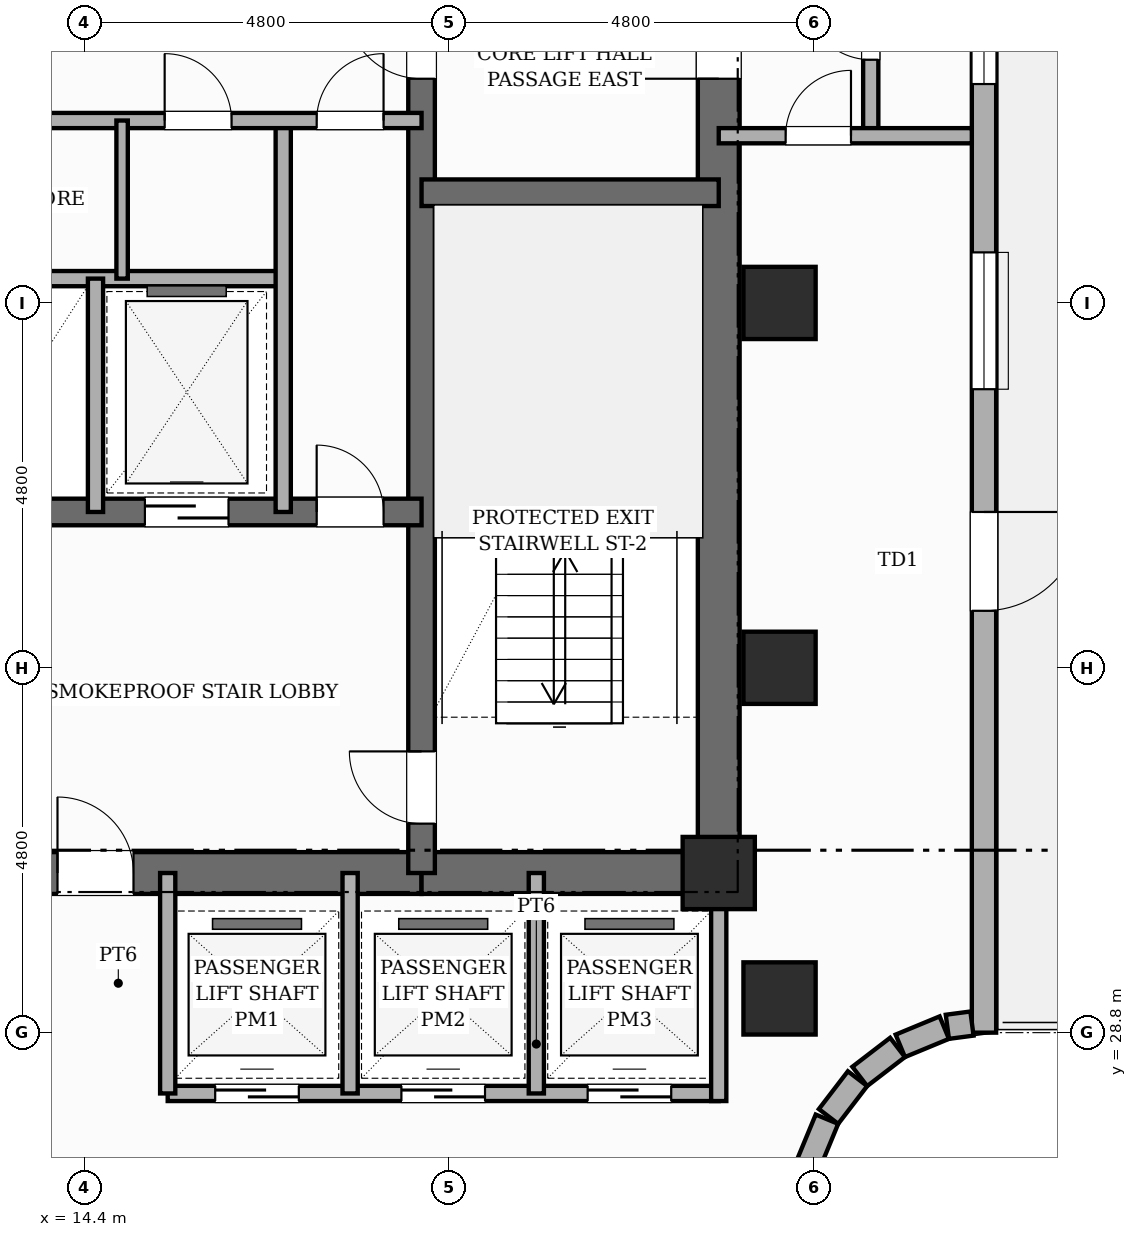
"""IFC4 building model, lengths in metres.
Left out: names, types, materials, properties, quantities, classifications, styles, units other than length and angle.
Written with IfcOpenShell. Run it as: python <this file> out.ifc"""

import sys

from ifc_helpers import new_model, si_unit, direction, frame, frame_2d, origin, origin_2d, place, context, subcontext, project, spatial, rectangle, extrude, element, fill, save


model = new_model("IFC4")
c1 = context("Model", 3, precision=1e-05, world=origin(), true_north=direction((0.0, 1.0)))
c2 = subcontext(c1, "Body", "Model", "MODEL_VIEW")
j1 = project(units=[si_unit("LENGTHUNIT", "METRE"), si_unit("PLANEANGLEUNIT", "RADIAN")], contexts=[c1])
p1 = place(None, origin())
s1 = spatial("IfcSite", under=j1, at=p1, CompositionType="ELEMENT")
p2 = place(p1, origin())
s2 = spatial("IfcBuilding", under=s1, at=p2, CompositionType="ELEMENT")
p3 = place(p2, frame((0.0, 0.0, 154.0)))
s3 = spatial("IfcBuildingStorey", under=s2, at=p3, CompositionType="ELEMENT", Elevation=154.0)
p4 = place(p3, frame((22.75, 30.625, 0.0), z_axis=(0.0, 0.0, 1.0), x_axis=(0.0, 1.0, 0.0)))
e1 = element("IfcWall", 1, at=p4, inside=s3, PredefinedType="SHEAR", context=c2, shape_type="SweptSolid", body=[
    extrude(rectangle(XDim=15.45, YDim=0.55, at=frame_2d((7.725, 0.0))), origin(), (0.0, 0.0, 1.0), 3.6),
])
p5 = place(p4, frame((10.725, 0.0, 0.0)))
e2 = element("IfcOpeningElement", 2, at=p5, cuts=e1, PredefinedType="OPENING", context=c2, shape_type="SweptSolid", body=[
    extrude(rectangle(XDim=1.0, YDim=2.15, at=frame_2d((0.5, 1.075))), frame((0.0, 0.285, 0.0), z_axis=(0.0, -1.0, 0.0), x_axis=(1.0, 0.0, 0.0)), (0.0, 0.0, 1.0), 0.57),
])
p6 = place(p3, frame((9.96, 30.9, 0.0), z_axis=(0.0, 0.0, 1.0), x_axis=(1.0, 0.0, 0.0)))
e3 = element("IfcWall", 3, at=p6, inside=s3, PredefinedType="SHEAR", context=c2, shape_type="SweptSolid", body=[
    extrude(rectangle(XDim=8.88, YDim=0.55, at=frame_2d((4.44, 0.0))), origin(), (0.0, 0.0, 1.0), 3.6),
])
p7 = place(p6, frame((4.09, 0.0, 0.0)))
e4 = element("IfcOpeningElement", 4, at=p7, cuts=e3, PredefinedType="OPENING", context=c2, shape_type="SweptSolid", body=[
    extrude(rectangle(XDim=1.0, YDim=2.15, at=frame_2d((0.5, 1.075))), frame((0.0, 0.285, 0.0), z_axis=(0.0, -1.0, 0.0), x_axis=(1.0, 0.0, 0.0)), (0.0, 0.0, 1.0), 0.57),
])
p8 = place(p3, frame((18.84, 30.9, 0.0), z_axis=(0.0, 0.0, 1.0), x_axis=(1.0, 0.0, 0.0)))
e5 = element("IfcWall", 5, at=p8, inside=s3, PredefinedType="SHEAR", context=c2, shape_type="SweptSolid", body=[
    extrude(rectangle(XDim=3.91, YDim=0.55, at=frame_2d((1.955, 0.0))), origin(), (0.0, 0.0, 1.0), 3.6),
])
p9 = place(p3, frame((18.84, 30.9, 0.0), z_axis=(0.0, 0.0, 1.0), x_axis=(0.0, 1.0, 0.0)))
e6 = element("IfcWall", 6, at=p9, inside=s3, PredefinedType="SHEAR", context=c2, shape_type="SweptSolid", body=[
    extrude(rectangle(XDim=14.9, YDim=0.35, at=frame_2d((7.45, 0.0))), origin(), (0.0, 0.0, 1.0), 3.6),
])
p10 = place(p9, frame((0.65, 0.0, 0.0)))
e7 = element("IfcOpeningElement", 7, at=p10, cuts=e6, PredefinedType="OPENING", context=c2, shape_type="SweptSolid", body=[
    extrude(rectangle(XDim=0.95, YDim=2.1, at=frame_2d((0.475, 1.05))), frame((0.0, 0.185, 0.0), z_axis=(0.0, -1.0, 0.0), x_axis=(1.0, 0.0, 0.0)), (0.0, 0.0, 1.0), 0.37),
])
p11 = place(p9, frame((10.45, 0.0, 0.0)))
e8 = element("IfcOpeningElement", 8, at=p11, cuts=e6, PredefinedType="OPENING", context=c2, shape_type="SweptSolid", body=[
    extrude(rectangle(XDim=1.0, YDim=2.15, at=frame_2d((0.5, 1.075))), frame((0.0, 0.185, 0.0), z_axis=(0.0, -1.0, 0.0), x_axis=(1.0, 0.0, 0.0)), (0.0, 0.0, 1.0), 0.37),
])
p12 = place(p3, frame((18.84, 39.85, 0.0), z_axis=(0.0, 0.0, 1.0), x_axis=(1.0, 0.0, 0.0)))
e9 = element("IfcWall", 9, at=p12, inside=s3, PredefinedType="SHEAR", context=c2, shape_type="SweptSolid", body=[
    extrude(rectangle(XDim=3.91, YDim=0.35, at=frame_2d((1.955, 0.0))), origin(), (0.0, 0.0, 1.0), 3.6),
])
p13 = place(p3, frame((9.96, 35.65, 0.0), z_axis=(0.0, 0.0, 1.0), x_axis=(1.0, 0.0, 0.0)))
e10 = element("IfcWall", 10, at=p13, inside=s3, PredefinedType="SHEAR", context=c2, shape_type="SweptSolid", body=[
    extrude(rectangle(XDim=8.88, YDim=0.35, at=frame_2d((4.44, 0.0))), origin(), (0.0, 0.0, 1.0), 3.6),
])
p14 = place(p13, frame((0.84, 0.0, 0.0)))
e11 = element("IfcOpeningElement", 11, at=p14, cuts=e10, PredefinedType="OPENING", context=c2, shape_type="SweptSolid", body=[
    extrude(rectangle(XDim=1.1, YDim=2.15, at=frame_2d((0.55, 1.075))), frame((0.0, 0.185, 0.0), z_axis=(0.0, -1.0, 0.0), x_axis=(1.0, 0.0, 0.0)), (0.0, 0.0, 1.0), 0.37),
])
p15 = place(p13, frame((5.24, 0.0, 0.0)))
e12 = element("IfcOpeningElement", 12, at=p15, cuts=e10, PredefinedType="OPENING", context=c2, shape_type="SweptSolid", body=[
    extrude(rectangle(XDim=1.1, YDim=2.15, at=frame_2d((0.55, 1.075))), frame((0.0, 0.185, 0.0), z_axis=(0.0, -1.0, 0.0), x_axis=(1.0, 0.0, 0.0)), (0.0, 0.0, 1.0), 0.37),
])
p16 = place(p13, frame((7.5, 0.0, 0.0)))
e13 = element("IfcOpeningElement", 13, at=p16, cuts=e10, PredefinedType="OPENING", context=c2, shape_type="SweptSolid", body=[
    extrude(rectangle(XDim=0.88, YDim=2.1, at=frame_2d((0.44, 1.05))), frame((0.0, 0.185, 0.0), z_axis=(0.0, -1.0, 0.0), x_axis=(1.0, 0.0, 0.0)), (0.0, 0.0, 1.0), 0.37),
])
for number, where, z_axis, x_axis in (
    (14, (22.75, 30.9, 0.0), (0.0, 0.0, 1.0), (1.0, 0.0, 0.0)),
    (15, (23.55, 29.25, 0.0), (0.0, 0.0, 1.0), (1.0, 0.0, 0.0)),
    (16, (23.55, 33.6, 0.0), (0.0, 0.0, 1.0), (1.0, 0.0, 0.0)),
    (17, (23.55, 38.4, 0.0), (0.0, 0.0, 1.0), (1.0, 0.0, 0.0)),
):
    element("IfcColumn", number, at=place(p3, frame(where, z_axis=z_axis, x_axis=x_axis)), inside=s3, PredefinedType="COLUMN", context=c2, shape_type="SweptSolid", body=[
        extrude(rectangle(XDim=0.95, YDim=0.95, at=origin_2d()), origin(), (0.0, 0.0, 1.0), 3.6),
    ])
p17 = place(p3, frame((26.24, 43.8, 0.0), z_axis=(0.0, 0.0, 1.0), x_axis=(0.0, -1.0, 0.0)))
e18 = element("IfcWall", 18, at=p17, inside=s3, PredefinedType="STANDARD", context=c2, shape_type="SweptSolid", body=[
    extrude(rectangle(XDim=15.0, YDim=0.32, at=frame_2d((7.5, 0.0))), origin(), (0.0, 0.0, 1.0), 3.36),
])
p18 = place(p17, frame((8.15, 0.0, 0.0)))
e19 = element("IfcOpeningElement", 19, at=p18, cuts=e18, PredefinedType="OPENING", context=c2, shape_type="SweptSolid", body=[
    extrude(rectangle(XDim=1.3, YDim=2.2, at=frame_2d((0.65, 1.1))), frame((0.0, 0.17, 0.0), z_axis=(0.0, -1.0, 0.0), x_axis=(1.0, 0.0, 0.0)), (0.0, 0.0, 1.0), 0.34),
])
p19 = place(p17, frame((4.735, 0.0, 0.8)))
e20 = element("IfcOpeningElement", 20, at=p19, cuts=e18, PredefinedType="OPENING", context=c2, shape_type="SweptSolid", body=[
    extrude(rectangle(XDim=1.8, YDim=2.1, at=frame_2d((0.9, 1.05))), frame((0.0, 0.17, 0.0), z_axis=(0.0, -1.0, 0.0), x_axis=(1.0, 0.0, 0.0)), (0.0, 0.0, 1.0), 0.34),
])
p20 = place(p17, frame((0.72, 0.0, 0.8)))
e21 = element("IfcOpeningElement", 21, at=p20, cuts=e18, PredefinedType="OPENING", context=c2, shape_type="SweptSolid", body=[
    extrude(rectangle(XDim=1.8, YDim=2.1, at=frame_2d((0.9, 1.05))), frame((0.0, 0.17, 0.0), z_axis=(0.0, -1.0, 0.0), x_axis=(1.0, 0.0, 0.0)), (0.0, 0.0, 1.0), 0.34),
])
p21 = place(p3, frame((26.082, 28.919, 0.0), z_axis=(0.0, 0.0, 1.0), x_axis=(-0.991512688813, -0.130009953168, 0.0)))
e22 = element("IfcWall", 22, at=p21, inside=s3, PredefinedType="STANDARD", context=c2, shape_type="SweptSolid", body=[
    extrude(rectangle(XDim=0.327, YDim=0.32, at=frame_2d((0.163, 0.0))), origin(), (0.0, 0.0, 1.0), 3.36),
])
p22 = place(p3, frame((25.718, 28.866, 0.0), z_axis=(0.0, 0.0, 1.0), x_axis=(-0.923836271867, -0.382787856107, 0.0)))
e23 = element("IfcWall", 23, at=p22, inside=s3, PredefinedType="STANDARD", context=c2, shape_type="SweptSolid", body=[
    extrude(rectangle(XDim=0.626, YDim=0.32, at=frame_2d((0.313, 0.0))), origin(), (0.0, 0.0, 1.0), 3.36),
])
for number, where, z_axis, x_axis in (
    (24, (25.103, 28.605, 0.0), (0.0, 0.0, 1.0), (-0.793, -0.609, 0.0)),
    (25, (24.576, 28.195, 0.0), (0.0, 0.0, 1.0), (-0.609, -0.793, 0.0)),
):
    element("IfcWall", number, at=place(p3, frame(where, z_axis=z_axis, x_axis=x_axis)), inside=s3, PredefinedType="STANDARD", context=c2, shape_type="SweptSolid", body=[
        extrude(rectangle(XDim=0.626, YDim=0.32, at=frame_2d((0.313, 0.0))), origin(), (0.0, 0.0, 1.0), 3.36),
    ])
p23 = place(p3, frame((24.174, 27.661, 0.0), z_axis=(0.0, 0.0, 1.0), x_axis=(-0.382455093999, -0.923974080304, 0.0)))
e26 = element("IfcWall", 26, at=p23, inside=s3, PredefinedType="STANDARD", context=c2, shape_type="SweptSolid", body=[
    extrude(rectangle(XDim=0.626, YDim=0.32, at=frame_2d((0.313, 0.0))), origin(), (0.0, 0.0, 1.0), 3.36),
])
p24 = place(p3, frame((9.96, 38.72, 0.0), z_axis=(0.0, 0.0, 1.0), x_axis=(1.0, 0.0, 0.0)))
e27 = element("IfcWall", 27, at=p24, inside=s3, PredefinedType="POLYGONAL", context=c2, shape_type="SweptSolid", body=[
    extrude(rectangle(XDim=7.06, YDim=0.2, at=frame_2d((3.53, 0.0))), origin(), (0.0, 0.0, 1.0), 3.36),
])
p25 = place(p3, frame((14.55, 35.65, 0.0), z_axis=(0.0, 0.0, 1.0), x_axis=(0.0, 1.0, 0.0)))
e28 = element("IfcWall", 28, at=p25, inside=s3, PredefinedType="POLYGONAL", context=c2, shape_type="SweptSolid", body=[
    extrude(rectangle(XDim=3.07, YDim=0.2, at=frame_2d((1.535, 0.0))), origin(), (0.0, 0.0, 1.0), 3.36),
])
p26 = place(p3, frame((17.02, 35.65, 0.0), z_axis=(0.0, 0.0, 1.0), x_axis=(0.0, 1.0, 0.0)))
e29 = element("IfcWall", 29, at=p26, inside=s3, PredefinedType="POLYGONAL", context=c2, shape_type="SweptSolid", body=[
    extrude(rectangle(XDim=5.15, YDim=0.2, at=frame_2d((2.575, 0.0))), origin(), (0.0, 0.0, 1.0), 3.36),
])
p27 = place(p3, frame((9.96, 40.8, 0.0), z_axis=(0.0, 0.0, 1.0), x_axis=(1.0, 0.0, 0.0)))
e30 = element("IfcWall", 30, at=p27, inside=s3, PredefinedType="POLYGONAL", context=c2, shape_type="SweptSolid", body=[
    extrude(rectangle(XDim=8.88, YDim=0.2, at=frame_2d((4.44, 0.0))), origin(), (0.0, 0.0, 1.0), 3.36),
])
p28 = place(p27, frame((7.5, 0.0, 0.0)))
e31 = element("IfcOpeningElement", 31, at=p28, cuts=e30, PredefinedType="OPENING", context=c2, shape_type="SweptSolid", body=[
    extrude(rectangle(XDim=0.88, YDim=2.1, at=frame_2d((0.44, 1.05))), frame((0.0, 0.11, 0.0), z_axis=(0.0, -1.0, 0.0), x_axis=(1.0, 0.0, 0.0)), (0.0, 0.0, 1.0), 0.22),
])
p29 = place(p27, frame((2.2, 0.0, 0.0)))
e32 = element("IfcOpeningElement", 32, at=p29, cuts=e30, PredefinedType="OPENING", context=c2, shape_type="SweptSolid", body=[
    extrude(rectangle(XDim=0.88, YDim=2.1, at=frame_2d((0.44, 1.05))), frame((0.0, 0.11, 0.0), z_axis=(0.0, -1.0, 0.0), x_axis=(1.0, 0.0, 0.0)), (0.0, 0.0, 1.0), 0.22),
])
p30 = place(p27, frame((5.5, 0.0, 0.0)))
e33 = element("IfcOpeningElement", 33, at=p30, cuts=e30, PredefinedType="OPENING", context=c2, shape_type="SweptSolid", body=[
    extrude(rectangle(XDim=0.88, YDim=2.1, at=frame_2d((0.44, 1.05))), frame((0.0, 0.11, 0.0), z_axis=(0.0, -1.0, 0.0), x_axis=(1.0, 0.0, 0.0)), (0.0, 0.0, 1.0), 0.22),
])
p31 = place(p3, frame((14.9, 38.72, 0.0), z_axis=(0.0, 0.0, 1.0), x_axis=(0.0, 1.0, 0.0)))
e34 = element("IfcWall", 34, at=p31, inside=s3, PredefinedType="PARTITIONING", context=c2, shape_type="SweptSolid", body=[
    extrude(rectangle(XDim=2.08, YDim=0.15, at=frame_2d((1.04, 0.0))), origin(), (0.0, 0.0, 1.0), 3.36),
])
p32 = place(p3, frame((15.5, 28.0, 0.0), z_axis=(0.0, 0.0, 1.0), x_axis=(1.0, 0.0, 0.0)))
e35 = element("IfcWall", 35, at=p32, inside=s3, PredefinedType="POLYGONAL", context=c2, shape_type="SweptSolid", body=[
    extrude(rectangle(XDim=7.25, YDim=0.2, at=frame_2d((3.625, 0.0))), origin(), (0.0, 0.0, 1.0), 3.36),
])
p33 = place(p32, frame((0.625, 0.0, 0.0)))
e36 = element("IfcOpeningElement", 36, at=p33, cuts=e35, PredefinedType="OPENING", context=c2, shape_type="SweptSolid", body=[
    extrude(rectangle(XDim=1.1, YDim=2.15, at=frame_2d((0.55, 1.075))), frame((0.0, 0.11, 0.0), z_axis=(0.0, -1.0, 0.0), x_axis=(1.0, 0.0, 0.0)), (0.0, 0.0, 1.0), 0.22),
])
p34 = place(p32, frame((3.075, 0.0, 0.0)))
e37 = element("IfcOpeningElement", 37, at=p34, cuts=e35, PredefinedType="OPENING", context=c2, shape_type="SweptSolid", body=[
    extrude(rectangle(XDim=1.1, YDim=2.15, at=frame_2d((0.55, 1.075))), frame((0.0, 0.11, 0.0), z_axis=(0.0, -1.0, 0.0), x_axis=(1.0, 0.0, 0.0)), (0.0, 0.0, 1.0), 0.22),
])
p35 = place(p32, frame((5.525, 0.0, 0.0)))
e38 = element("IfcOpeningElement", 38, at=p35, cuts=e35, PredefinedType="OPENING", context=c2, shape_type="SweptSolid", body=[
    extrude(rectangle(XDim=1.1, YDim=2.15, at=frame_2d((0.55, 1.075))), frame((0.0, 0.11, 0.0), z_axis=(0.0, -1.0, 0.0), x_axis=(1.0, 0.0, 0.0)), (0.0, 0.0, 1.0), 0.22),
])
p36 = place(p3, frame((15.5, 28.0, 0.0), z_axis=(0.0, 0.0, 1.0), x_axis=(0.0, 1.0, 0.0)))
e39 = element("IfcWall", 39, at=p36, inside=s3, PredefinedType="POLYGONAL", context=c2, shape_type="SweptSolid", body=[
    extrude(rectangle(XDim=2.9, YDim=0.2, at=frame_2d((1.45, 0.0))), origin(), (0.0, 0.0, 1.0), 3.36),
])
p37 = place(p3, frame((22.75, 27.9, 0.0), z_axis=(0.0, 0.0, 1.0), x_axis=(0.0, 1.0, 0.0)))
e40 = element("IfcWall", 40, at=p37, inside=s3, PredefinedType="POLYGONAL", context=c2, shape_type="SweptSolid", body=[
    extrude(rectangle(XDim=3.0, YDim=0.2, at=frame_2d((1.5, 0.0))), origin(), (0.0, 0.0, 1.0), 3.36),
])
for number, where, z_axis, x_axis in (
    (41, (17.9, 28.0, 0.0), (0.0, 0.0, 1.0), (0.0, 1.0, 0.0)),
    (42, (20.35, 28.0, 0.0), (0.0, 0.0, 1.0), (0.0, 1.0, 0.0)),
):
    element("IfcWall", number, at=place(p3, frame(where, z_axis=z_axis, x_axis=x_axis)), inside=s3, PredefinedType="POLYGONAL", context=c2, shape_type="SweptSolid", body=[
        extrude(rectangle(XDim=2.9, YDim=0.2, at=frame_2d((1.45, 0.0))), origin(), (0.0, 0.0, 1.0), 3.36),
    ])
p38 = place(p3, frame((24.75, 40.6, 0.0), z_axis=(0.0, 0.0, 1.0), x_axis=(0.0, 1.0, 0.0)))
e43 = element("IfcWall", 43, at=p38, inside=s3, PredefinedType="PARTITIONING", context=c2, shape_type="SweptSolid", body=[
    extrude(rectangle(XDim=4.2, YDim=0.2, at=frame_2d((2.1, 0.0))), origin(), (0.0, 0.0, 1.0), 3.36),
])
p39 = place(p38, frame((1.0, 0.0, 0.0)))
e44 = element("IfcOpeningElement", 44, at=p39, cuts=e43, PredefinedType="OPENING", context=c2, shape_type="SweptSolid", body=[
    extrude(rectangle(XDim=0.86, YDim=2.1, at=frame_2d((0.43, 1.05))), frame((0.0, 0.11, 0.0), z_axis=(0.0, -1.0, 0.0), x_axis=(1.0, 0.0, 0.0)), (0.0, 0.0, 1.0), 0.22),
])
p40 = place(p3, frame((22.75, 40.6, 0.0), z_axis=(0.0, 0.0, 1.0), x_axis=(1.0, 0.0, 0.0)))
e45 = element("IfcWall", 45, at=p40, inside=s3, PredefinedType="PARTITIONING", context=c2, shape_type="SweptSolid", body=[
    extrude(rectangle(XDim=3.33, YDim=0.2, at=frame_2d((1.665, 0.0))), origin(), (0.0, 0.0, 1.0), 3.36),
])
p41 = place(p40, frame((0.88, 0.0, 0.0)))
e46 = element("IfcOpeningElement", 46, at=p41, cuts=e45, PredefinedType="OPENING", context=c2, shape_type="SweptSolid", body=[
    extrude(rectangle(XDim=0.86, YDim=2.1, at=frame_2d((0.43, 1.05))), frame((0.0, 0.11, 0.0), z_axis=(0.0, -1.0, 0.0), x_axis=(1.0, 0.0, 0.0)), (0.0, 0.0, 1.0), 0.22),
])
p42 = place(p18, origin())
e47 = element("IfcDoor", 47, at=p42, inside=s3, OperationType="SINGLE_SWING_LEFT", PredefinedType="DOOR", context=c2, shape_type="SweptSolid", body=[
    extrude(rectangle(XDim=1.3, YDim=2.2, at=frame_2d((0.65, 1.1))), frame((0.0, 0.025, 0.0), z_axis=(0.0, -1.0, 0.0), x_axis=(1.0, 0.0, 0.0)), (0.0, 0.0, 1.0), 0.05),
])
fill(e19, e47)
p43 = place(p19, origin())
e48 = element("IfcWindow", 48, at=p43, inside=s3, PartitioningType="SINGLE_PANEL", PredefinedType="WINDOW", context=c2, shape_type="SweptSolid", body=[
    extrude(rectangle(XDim=1.8, YDim=2.1, at=frame_2d((0.9, 1.05))), frame((0.0, 0.03, 0.0), z_axis=(0.0, -1.0, 0.0), x_axis=(1.0, 0.0, 0.0)), (0.0, 0.0, 1.0), 0.06),
])
fill(e20, e48)
p44 = place(p20, origin())
e49 = element("IfcWindow", 49, at=p44, inside=s3, PartitioningType="SINGLE_PANEL", PredefinedType="WINDOW", context=c2, shape_type="SweptSolid", body=[
    extrude(rectangle(XDim=1.8, YDim=2.1, at=frame_2d((0.9, 1.05))), frame((0.0, 0.03, 0.0), z_axis=(0.0, -1.0, 0.0), x_axis=(1.0, 0.0, 0.0)), (0.0, 0.0, 1.0), 0.06),
])
fill(e21, e49)
p45 = place(p10, origin())
e50 = element("IfcDoor", 50, at=p45, inside=s3, OperationType="SINGLE_SWING_RIGHT", PredefinedType="DOOR", context=c2, shape_type="SweptSolid", body=[
    extrude(rectangle(XDim=0.95, YDim=2.1, at=frame_2d((0.475, 1.05))), frame((0.0, 0.025, 0.0), z_axis=(0.0, -1.0, 0.0), x_axis=(1.0, 0.0, 0.0)), (0.0, 0.0, 1.0), 0.05),
])
fill(e7, e50)
p46 = place(p7, origin())
e51 = element("IfcDoor", 51, at=p46, inside=s3, OperationType="SINGLE_SWING_LEFT", PredefinedType="DOOR", context=c2, shape_type="SweptSolid", body=[
    extrude(rectangle(XDim=1.0, YDim=2.15, at=frame_2d((0.5, 1.075))), frame((0.0, 0.025, 0.0), z_axis=(0.0, -1.0, 0.0), x_axis=(1.0, 0.0, 0.0)), (0.0, 0.0, 1.0), 0.05),
])
fill(e4, e51)
p47 = place(p15, origin())
e52 = element("IfcDoor", 52, at=p47, inside=s3, OperationType="SLIDING_TO_RIGHT", PredefinedType="DOOR", context=c2, shape_type="SweptSolid", body=[
    extrude(rectangle(XDim=1.1, YDim=2.15, at=frame_2d((0.55, 1.075))), frame((0.0, 0.025, 0.0), z_axis=(0.0, -1.0, 0.0), x_axis=(1.0, 0.0, 0.0)), (0.0, 0.0, 1.0), 0.05),
])
fill(e12, e52)
p48 = place(p16, origin())
e53 = element("IfcDoor", 53, at=p48, inside=s3, OperationType="SINGLE_SWING_LEFT", PredefinedType="DOOR", context=c2, shape_type="SweptSolid", body=[
    extrude(rectangle(XDim=0.88, YDim=2.1, at=frame_2d((0.44, 1.05))), frame((0.0, 0.025, 0.0), z_axis=(0.0, -1.0, 0.0), x_axis=(1.0, 0.0, 0.0)), (0.0, 0.0, 1.0), 0.05),
])
fill(e13, e53)
p49 = place(p28, origin())
e54 = element("IfcDoor", 54, at=p49, inside=s3, OperationType="SINGLE_SWING_RIGHT", PredefinedType="DOOR", context=c2, shape_type="SweptSolid", body=[
    extrude(rectangle(XDim=0.88, YDim=2.1, at=frame_2d((0.44, 1.05))), frame((0.0, 0.025, 0.0), z_axis=(0.0, -1.0, 0.0), x_axis=(1.0, 0.0, 0.0)), (0.0, 0.0, 1.0), 0.05),
])
fill(e31, e54)
p50 = place(p11, origin())
e55 = element("IfcDoor", 55, at=p50, inside=s3, OperationType="SINGLE_SWING_RIGHT", PredefinedType="DOOR", context=c2, shape_type="SweptSolid", body=[
    extrude(rectangle(XDim=1.0, YDim=2.15, at=frame_2d((0.5, 1.075))), frame((0.0, 0.025, 0.0), z_axis=(0.0, -1.0, 0.0), x_axis=(1.0, 0.0, 0.0)), (0.0, 0.0, 1.0), 0.05),
])
fill(e8, e55)
p51 = place(p5, origin())
e56 = element("IfcDoor", 56, at=p51, inside=s3, OperationType="SINGLE_SWING_LEFT", PredefinedType="DOOR", context=c2, shape_type="SweptSolid", body=[
    extrude(rectangle(XDim=1.0, YDim=2.15, at=frame_2d((0.5, 1.075))), frame((0.0, 0.025, 0.0), z_axis=(0.0, -1.0, 0.0), x_axis=(1.0, 0.0, 0.0)), (0.0, 0.0, 1.0), 0.05),
])
fill(e2, e56)
p52 = place(p30, origin())
e57 = element("IfcDoor", 57, at=p52, inside=s3, OperationType="SINGLE_SWING_LEFT", PredefinedType="DOOR", context=c2, shape_type="SweptSolid", body=[
    extrude(rectangle(XDim=0.88, YDim=2.1, at=frame_2d((0.44, 1.05))), frame((0.0, 0.025, 0.0), z_axis=(0.0, -1.0, 0.0), x_axis=(1.0, 0.0, 0.0)), (0.0, 0.0, 1.0), 0.05),
])
fill(e33, e57)
p53 = place(p33, origin())
e58 = element("IfcDoor", 58, at=p53, inside=s3, OperationType="SLIDING_TO_LEFT", PredefinedType="DOOR", context=c2, shape_type="SweptSolid", body=[
    extrude(rectangle(XDim=1.1, YDim=2.15, at=frame_2d((0.55, 1.075))), frame((0.0, 0.025, 0.0), z_axis=(0.0, -1.0, 0.0), x_axis=(1.0, 0.0, 0.0)), (0.0, 0.0, 1.0), 0.05),
])
fill(e36, e58)
p54 = place(p34, origin())
e59 = element("IfcDoor", 59, at=p54, inside=s3, OperationType="SLIDING_TO_RIGHT", PredefinedType="DOOR", context=c2, shape_type="SweptSolid", body=[
    extrude(rectangle(XDim=1.1, YDim=2.15, at=frame_2d((0.55, 1.075))), frame((0.0, 0.025, 0.0), z_axis=(0.0, -1.0, 0.0), x_axis=(1.0, 0.0, 0.0)), (0.0, 0.0, 1.0), 0.05),
])
fill(e37, e59)
p55 = place(p35, origin())
e60 = element("IfcDoor", 60, at=p55, inside=s3, OperationType="SLIDING_TO_LEFT", PredefinedType="DOOR", context=c2, shape_type="SweptSolid", body=[
    extrude(rectangle(XDim=1.1, YDim=2.15, at=frame_2d((0.55, 1.075))), frame((0.0, 0.025, 0.0), z_axis=(0.0, -1.0, 0.0), x_axis=(1.0, 0.0, 0.0)), (0.0, 0.0, 1.0), 0.05),
])
fill(e38, e60)
p56 = place(p39, origin())
e61 = element("IfcDoor", 61, at=p56, inside=s3, OperationType="SINGLE_SWING_RIGHT", PredefinedType="DOOR", context=c2, shape_type="SweptSolid", body=[
    extrude(rectangle(XDim=0.86, YDim=2.1, at=frame_2d((0.43, 1.05))), frame((0.0, 0.025, 0.0), z_axis=(0.0, -1.0, 0.0), x_axis=(1.0, 0.0, 0.0)), (0.0, 0.0, 1.0), 0.05),
])
fill(e44, e61)
p57 = place(p41, origin())
e62 = element("IfcDoor", 62, at=p57, inside=s3, OperationType="SINGLE_SWING_RIGHT", PredefinedType="DOOR", context=c2, shape_type="SweptSolid", body=[
    extrude(rectangle(XDim=0.86, YDim=2.1, at=frame_2d((0.43, 1.05))), frame((0.0, 0.025, 0.0), z_axis=(0.0, -1.0, 0.0), x_axis=(1.0, 0.0, 0.0)), (0.0, 0.0, 1.0), 0.05),
])
fill(e46, e62)
save(model, sys.argv[1])
